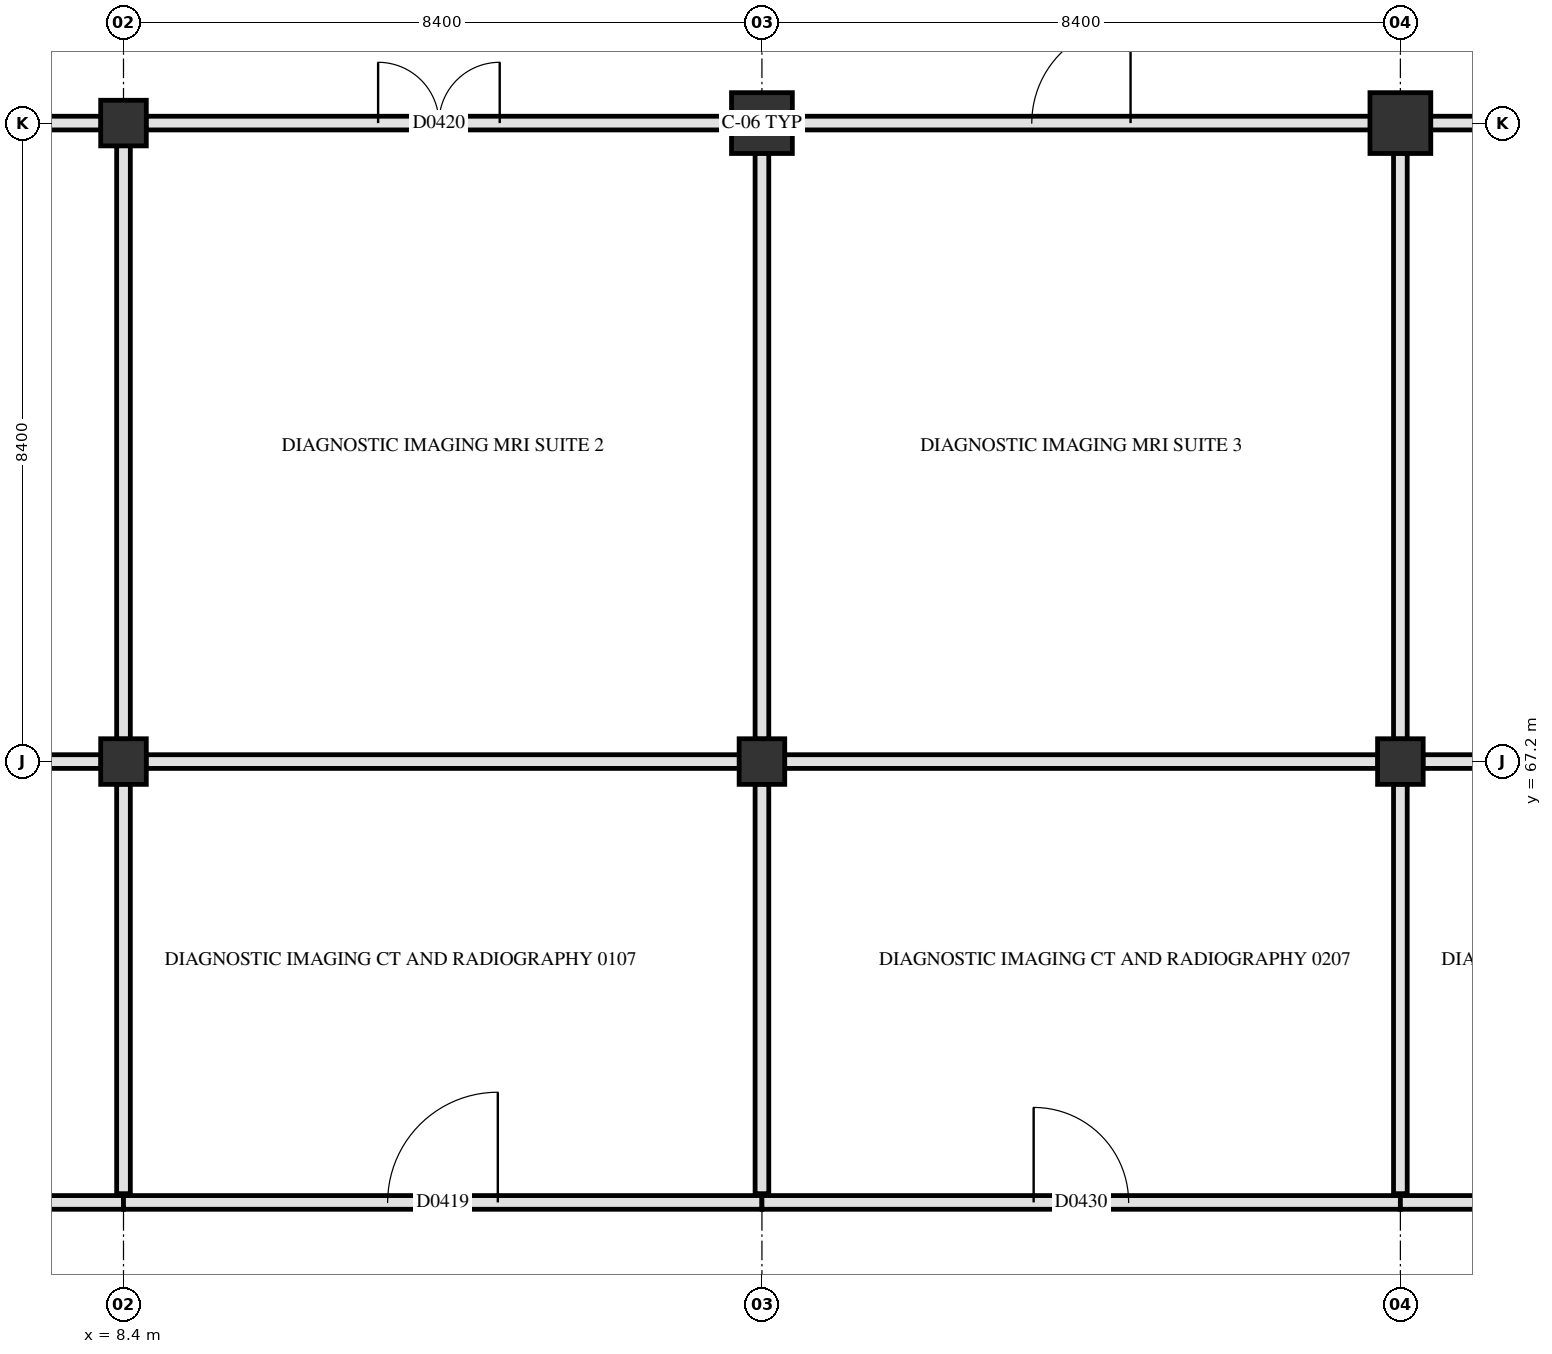
"""IFC4 building model, lengths in metres.
Left out: names, types, materials, properties, quantities, classifications, styles, units other than length and angle.
Written with IfcOpenShell. Run it as: python <this file> out.ifc"""

import sys

from ifc_helpers import new_model, si_unit, direction, frame, frame_2d, origin, origin_2d, place, context, subcontext, project, spatial, rectangle, circle, extrude, element, fill, save


model = new_model("IFC4")
c1 = context("Model", 3, precision=1e-05, world=origin(), true_north=direction((0.0, 1.0)))
c2 = subcontext(c1, "Body", "Model", "MODEL_VIEW")
j1 = project(units=[si_unit("LENGTHUNIT", "METRE"), si_unit("PLANEANGLEUNIT", "RADIAN")], contexts=[c1])
p1 = place(None, origin())
s1 = spatial("IfcSite", under=j1, at=p1, CompositionType="ELEMENT")
p2 = place(p1, origin())
s2 = spatial("IfcBuilding", under=s1, at=p2, CompositionType="ELEMENT")
p3 = place(p2, origin())
s3 = spatial("IfcBuildingStorey", under=s2, at=p3, CompositionType="ELEMENT", Elevation=0.0)
for number, where, z_axis, x_axis in (
    (1, (8.4, 67.2, 0.0), (0.0, 0.0, 1.0), (1.0, 0.0, 0.0)),
    (2, (8.4, 75.6, 0.0), (0.0, 0.0, 1.0), (1.0, 0.0, 0.0)),
    (3, (16.8, 67.2, 0.0), (0.0, 0.0, 1.0), (1.0, 0.0, 0.0)),
):
    element("IfcColumn", number, at=place(p3, frame(where, z_axis=z_axis, x_axis=x_axis)), inside=s3, PredefinedType="COLUMN", context=c2, shape_type="SweptSolid", body=[
        extrude(rectangle(XDim=0.6, YDim=0.6, at=origin_2d()), origin(), (0.0, 0.0, 1.0), 4.8),
    ])
p4 = place(p3, frame((16.8, 75.6, 0.0), z_axis=(0.0, 0.0, 1.0), x_axis=(1.0, 0.0, 0.0)))
e4 = element("IfcColumn", 4, at=p4, inside=s3, PredefinedType="COLUMN", context=c2, shape_type="SweptSolid", body=[
    extrude(circle(Radius=0.4, at=origin_2d()), origin(), (0.0, 0.0, 1.0), 4.8),
])
p5 = place(p3, frame((25.2, 67.2, 0.0), z_axis=(0.0, 0.0, 1.0), x_axis=(1.0, 0.0, 0.0)))
e5 = element("IfcColumn", 5, at=p5, inside=s3, PredefinedType="COLUMN", context=c2, shape_type="SweptSolid", body=[
    extrude(rectangle(XDim=0.6, YDim=0.6, at=origin_2d()), origin(), (0.0, 0.0, 1.0), 4.8),
])
p6 = place(p3, frame((25.2, 75.6, 0.0), z_axis=(0.0, 0.0, 1.0), x_axis=(1.0, 0.0, 0.0)))
e6 = element("IfcColumn", 6, at=p6, inside=s3, PredefinedType="COLUMN", context=c2, shape_type="SweptSolid", body=[
    extrude(circle(Radius=0.4, at=origin_2d()), origin(), (0.0, 0.0, 1.0), 4.8),
])
p7 = place(p3, frame((0.28, 61.4, 0.0), z_axis=(0.0, 0.0, 1.0), x_axis=(1.0, 0.0, 0.0)))
e7 = element("IfcWall", 7, at=p7, inside=s3, PredefinedType="PARTITIONING", context=c2, shape_type="SweptSolid", body=[
    extrude(rectangle(XDim=8.12, YDim=0.18, at=frame_2d((4.06, 0.0))), origin(), (0.0, 0.0, 1.0), 3.89),
])
p8 = place(p7, frame((3.45, 0.0, 0.0)))
e8 = element("IfcOpeningElement", 8, at=p8, cuts=e7, PredefinedType="OPENING", context=c2, shape_type="SweptSolid", body=[
    extrude(rectangle(XDim=1.22, YDim=2.18, at=frame_2d((0.61, 1.09))), frame((0.0, 0.1, 0.0), z_axis=(0.0, -1.0, 0.0), x_axis=(1.0, 0.0, 0.0)), (0.0, 0.0, 1.0), 0.2),
])
p9 = place(p3, frame((8.4, 61.4, 0.0), z_axis=(0.0, 0.0, 1.0), x_axis=(1.0, 0.0, 0.0)))
e9 = element("IfcWall", 9, at=p9, inside=s3, PredefinedType="PARTITIONING", context=c2, shape_type="SweptSolid", body=[
    extrude(rectangle(XDim=8.4, YDim=0.18, at=frame_2d((4.2, 0.0))), origin(), (0.0, 0.0, 1.0), 3.89),
])
p10 = place(p9, frame((3.475, 0.0, 0.0)))
e10 = element("IfcOpeningElement", 10, at=p10, cuts=e9, PredefinedType="OPENING", context=c2, shape_type="SweptSolid", body=[
    extrude(rectangle(XDim=1.45, YDim=2.2, at=frame_2d((0.725, 1.1))), frame((0.0, 0.1, 0.0), z_axis=(0.0, -1.0, 0.0), x_axis=(1.0, 0.0, 0.0)), (0.0, 0.0, 1.0), 0.2),
])
p11 = place(p3, frame((16.8, 61.4, 0.0), z_axis=(0.0, 0.0, 1.0), x_axis=(1.0, 0.0, 0.0)))
e11 = element("IfcWall", 11, at=p11, inside=s3, PredefinedType="PARTITIONING", context=c2, shape_type="SweptSolid", body=[
    extrude(rectangle(XDim=8.4, YDim=0.18, at=frame_2d((4.2, 0.0))), origin(), (0.0, 0.0, 1.0), 3.89),
])
p12 = place(p11, frame((3.575, 0.0, 0.0)))
e12 = element("IfcOpeningElement", 12, at=p12, cuts=e11, PredefinedType="OPENING", context=c2, shape_type="SweptSolid", body=[
    extrude(rectangle(XDim=1.25, YDim=2.2, at=frame_2d((0.625, 1.1))), frame((0.0, 0.1, 0.0), z_axis=(0.0, -1.0, 0.0), x_axis=(1.0, 0.0, 0.0)), (0.0, 0.0, 1.0), 0.2),
])
p13 = place(p3, frame((25.2, 61.4, 0.0), z_axis=(0.0, 0.0, 1.0), x_axis=(1.0, 0.0, 0.0)))
e13 = element("IfcWall", 13, at=p13, inside=s3, PredefinedType="PARTITIONING", context=c2, shape_type="SweptSolid", body=[
    extrude(rectangle(XDim=8.4, YDim=0.18, at=frame_2d((4.2, 0.0))), origin(), (0.0, 0.0, 1.0), 3.89),
])
p14 = place(p13, frame((3.64, 0.0, 0.0)))
e14 = element("IfcOpeningElement", 14, at=p14, cuts=e13, PredefinedType="OPENING", context=c2, shape_type="SweptSolid", body=[
    extrude(rectangle(XDim=1.12, YDim=2.18, at=frame_2d((0.56, 1.09))), frame((0.0, 0.1, 0.0), z_axis=(0.0, -1.0, 0.0), x_axis=(1.0, 0.0, 0.0)), (0.0, 0.0, 1.0), 0.2),
])
p15 = place(p3, frame((0.295, 67.2, 0.0), z_axis=(0.0, 0.0, 1.0), x_axis=(1.0, 0.0, 0.0)))
e15 = element("IfcWall", 15, at=p15, inside=s3, PredefinedType="PARTITIONING", context=c2, shape_type="SweptSolid", body=[
    extrude(rectangle(XDim=7.81, YDim=0.18, at=frame_2d((3.905, 0.0))), origin(), (0.0, 0.0, 1.0), 3.84),
])
p16 = place(p3, frame((8.695, 67.2, 0.0), z_axis=(0.0, 0.0, 1.0), x_axis=(1.0, 0.0, 0.0)))
e16 = element("IfcWall", 16, at=p16, inside=s3, PredefinedType="PARTITIONING", context=c2, shape_type="SweptSolid", body=[
    extrude(rectangle(XDim=7.81, YDim=0.18, at=frame_2d((3.905, 0.0))), origin(), (0.0, 0.0, 1.0), 3.84),
])
p17 = place(p3, frame((17.095, 67.2, 0.0), z_axis=(0.0, 0.0, 1.0), x_axis=(1.0, 0.0, 0.0)))
e17 = element("IfcWall", 17, at=p17, inside=s3, PredefinedType="PARTITIONING", context=c2, shape_type="SweptSolid", body=[
    extrude(rectangle(XDim=7.81, YDim=0.18, at=frame_2d((3.905, 0.0))), origin(), (0.0, 0.0, 1.0), 3.84),
])
p18 = place(p3, frame((25.495, 67.2, 0.0), z_axis=(0.0, 0.0, 1.0), x_axis=(1.0, 0.0, 0.0)))
e18 = element("IfcWall", 18, at=p18, inside=s3, PredefinedType="PARTITIONING", context=c2, shape_type="SweptSolid", body=[
    extrude(rectangle(XDim=7.81, YDim=0.18, at=frame_2d((3.905, 0.0))), origin(), (0.0, 0.0, 1.0), 3.84),
])
p19 = place(p3, frame((0.295, 75.6, 0.0), z_axis=(0.0, 0.0, 1.0), x_axis=(1.0, 0.0, 0.0)))
e19 = element("IfcWall", 19, at=p19, inside=s3, PredefinedType="PARTITIONING", context=c2, shape_type="SweptSolid", body=[
    extrude(rectangle(XDim=7.81, YDim=0.18, at=frame_2d((3.905, 0.0))), origin(), (0.0, 0.0, 1.0), 3.84),
])
p20 = place(p19, frame((3.245, 0.0, 0.0)))
e20 = element("IfcOpeningElement", 20, at=p20, cuts=e19, PredefinedType="OPENING", context=c2, shape_type="SweptSolid", body=[
    extrude(rectangle(XDim=1.32, YDim=2.18, at=frame_2d((0.66, 1.09))), frame((0.0, 0.1, 0.0), z_axis=(0.0, -1.0, 0.0), x_axis=(1.0, 0.0, 0.0)), (0.0, 0.0, 1.0), 0.2),
])
p21 = place(p3, frame((8.695, 75.6, 0.0), z_axis=(0.0, 0.0, 1.0), x_axis=(1.0, 0.0, 0.0)))
e21 = element("IfcWall", 21, at=p21, inside=s3, PredefinedType="PARTITIONING", context=c2, shape_type="SweptSolid", body=[
    extrude(rectangle(XDim=7.71, YDim=0.18, at=frame_2d((3.855, 0.0))), origin(), (0.0, 0.0, 1.0), 3.84),
])
p22 = place(p21, frame((3.055, 0.0, 0.0)))
e22 = element("IfcOpeningElement", 22, at=p22, cuts=e21, PredefinedType="OPENING", context=c2, shape_type="SweptSolid", body=[
    extrude(rectangle(XDim=1.6, YDim=2.25, at=frame_2d((0.8, 1.125))), frame((0.0, 0.1, 0.0), z_axis=(0.0, -1.0, 0.0), x_axis=(1.0, 0.0, 0.0)), (0.0, 0.0, 1.0), 0.2),
])
p23 = place(p3, frame((17.195, 75.6, 0.0), z_axis=(0.0, 0.0, 1.0), x_axis=(1.0, 0.0, 0.0)))
e23 = element("IfcWall", 23, at=p23, inside=s3, PredefinedType="PARTITIONING", context=c2, shape_type="SweptSolid", body=[
    extrude(rectangle(XDim=7.61, YDim=0.18, at=frame_2d((3.805, 0.0))), origin(), (0.0, 0.0, 1.0), 3.84),
])
p24 = place(p23, frame((3.155, 0.0, 0.0)))
e24 = element("IfcOpeningElement", 24, at=p24, cuts=e23, PredefinedType="OPENING", context=c2, shape_type="SweptSolid", body=[
    extrude(rectangle(XDim=1.3, YDim=2.2, at=frame_2d((0.65, 1.1))), frame((0.0, 0.1, 0.0), z_axis=(0.0, -1.0, 0.0), x_axis=(1.0, 0.0, 0.0)), (0.0, 0.0, 1.0), 0.2),
])
p25 = place(p3, frame((25.595, 75.6, 0.0), z_axis=(0.0, 0.0, 1.0), x_axis=(1.0, 0.0, 0.0)))
e25 = element("IfcWall", 25, at=p25, inside=s3, PredefinedType="PARTITIONING", context=c2, shape_type="SweptSolid", body=[
    extrude(rectangle(XDim=7.61, YDim=0.18, at=frame_2d((3.805, 0.0))), origin(), (0.0, 0.0, 1.0), 3.84),
])
p26 = place(p25, frame((3.215, 0.0, 0.0)))
e26 = element("IfcOpeningElement", 26, at=p26, cuts=e25, PredefinedType="OPENING", context=c2, shape_type="SweptSolid", body=[
    extrude(rectangle(XDim=1.18, YDim=2.18, at=frame_2d((0.59, 1.09))), frame((0.0, 0.1, 0.0), z_axis=(0.0, -1.0, 0.0), x_axis=(1.0, 0.0, 0.0)), (0.0, 0.0, 1.0), 0.2),
])
p27 = place(p3, frame((8.4, 61.515, 0.0), z_axis=(0.0, 0.0, 1.0), x_axis=(0.0, 1.0, 0.0)))
e27 = element("IfcWall", 27, at=p27, inside=s3, PredefinedType="PARTITIONING", context=c2, shape_type="SweptSolid", body=[
    extrude(rectangle(XDim=5.39, YDim=0.18, at=frame_2d((2.695, 0.0))), origin(), (0.0, 0.0, 1.0), 3.89),
])
p28 = place(p3, frame((8.4, 67.495, 0.0), z_axis=(0.0, 0.0, 1.0), x_axis=(0.0, 1.0, 0.0)))
e28 = element("IfcWall", 28, at=p28, inside=s3, PredefinedType="PARTITIONING", context=c2, shape_type="SweptSolid", body=[
    extrude(rectangle(XDim=7.81, YDim=0.18, at=frame_2d((3.905, 0.0))), origin(), (0.0, 0.0, 1.0), 3.89),
])
p29 = place(p3, frame((16.8, 61.515, 0.0), z_axis=(0.0, 0.0, 1.0), x_axis=(0.0, 1.0, 0.0)))
e29 = element("IfcWall", 29, at=p29, inside=s3, PredefinedType="PARTITIONING", context=c2, shape_type="SweptSolid", body=[
    extrude(rectangle(XDim=5.39, YDim=0.18, at=frame_2d((2.695, 0.0))), origin(), (0.0, 0.0, 1.0), 3.89),
])
p30 = place(p3, frame((16.8, 67.495, 0.0), z_axis=(0.0, 0.0, 1.0), x_axis=(0.0, 1.0, 0.0)))
e30 = element("IfcWall", 30, at=p30, inside=s3, PredefinedType="PARTITIONING", context=c2, shape_type="SweptSolid", body=[
    extrude(rectangle(XDim=7.71, YDim=0.18, at=frame_2d((3.855, 0.0))), origin(), (0.0, 0.0, 1.0), 3.89),
])
p31 = place(p3, frame((25.2, 61.515, 0.0), z_axis=(0.0, 0.0, 1.0), x_axis=(0.0, 1.0, 0.0)))
e31 = element("IfcWall", 31, at=p31, inside=s3, PredefinedType="PARTITIONING", context=c2, shape_type="SweptSolid", body=[
    extrude(rectangle(XDim=5.39, YDim=0.18, at=frame_2d((2.695, 0.0))), origin(), (0.0, 0.0, 1.0), 3.89),
])
p32 = place(p3, frame((25.2, 67.495, 0.0), z_axis=(0.0, 0.0, 1.0), x_axis=(0.0, 1.0, 0.0)))
e32 = element("IfcWall", 32, at=p32, inside=s3, PredefinedType="PARTITIONING", context=c2, shape_type="SweptSolid", body=[
    extrude(rectangle(XDim=7.71, YDim=0.18, at=frame_2d((3.855, 0.0))), origin(), (0.0, 0.0, 1.0), 3.89),
])
p33 = place(p10, origin())
e33 = element("IfcDoor", 33, at=p33, inside=s3, OperationType="SINGLE_SWING_RIGHT", PredefinedType="DOOR", context=c2, shape_type="SweptSolid", body=[
    extrude(rectangle(XDim=1.45, YDim=2.2, at=frame_2d((0.725, 1.1))), frame((0.0, 0.025, 0.0), z_axis=(0.0, -1.0, 0.0), x_axis=(1.0, 0.0, 0.0)), (0.0, 0.0, 1.0), 0.05),
])
fill(e10, e33)
p34 = place(p22, origin())
e34 = element("IfcDoor", 34, at=p34, inside=s3, OperationType="DOUBLE_SWING_LEFT", PredefinedType="DOOR", context=c2, shape_type="SweptSolid", body=[
    extrude(rectangle(XDim=1.6, YDim=2.25, at=frame_2d((0.8, 1.125))), frame((0.0, 0.025, 0.0), z_axis=(0.0, -1.0, 0.0), x_axis=(1.0, 0.0, 0.0)), (0.0, 0.0, 1.0), 0.05),
])
fill(e22, e34)
p35 = place(p12, origin())
e35 = element("IfcDoor", 35, at=p35, inside=s3, OperationType="SINGLE_SWING_LEFT", PredefinedType="DOOR", context=c2, shape_type="SweptSolid", body=[
    extrude(rectangle(XDim=1.25, YDim=2.2, at=frame_2d((0.625, 1.1))), frame((0.0, 0.025, 0.0), z_axis=(0.0, -1.0, 0.0), x_axis=(1.0, 0.0, 0.0)), (0.0, 0.0, 1.0), 0.05),
])
fill(e12, e35)
p36 = place(p24, origin())
e36 = element("IfcDoor", 36, at=p36, inside=s3, OperationType="SINGLE_SWING_RIGHT", PredefinedType="DOOR", context=c2, shape_type="SweptSolid", body=[
    extrude(rectangle(XDim=1.3, YDim=2.2, at=frame_2d((0.65, 1.1))), frame((0.0, 0.025, 0.0), z_axis=(0.0, -1.0, 0.0), x_axis=(1.0, 0.0, 0.0)), (0.0, 0.0, 1.0), 0.05),
])
fill(e24, e36)
save(model, sys.argv[1])
